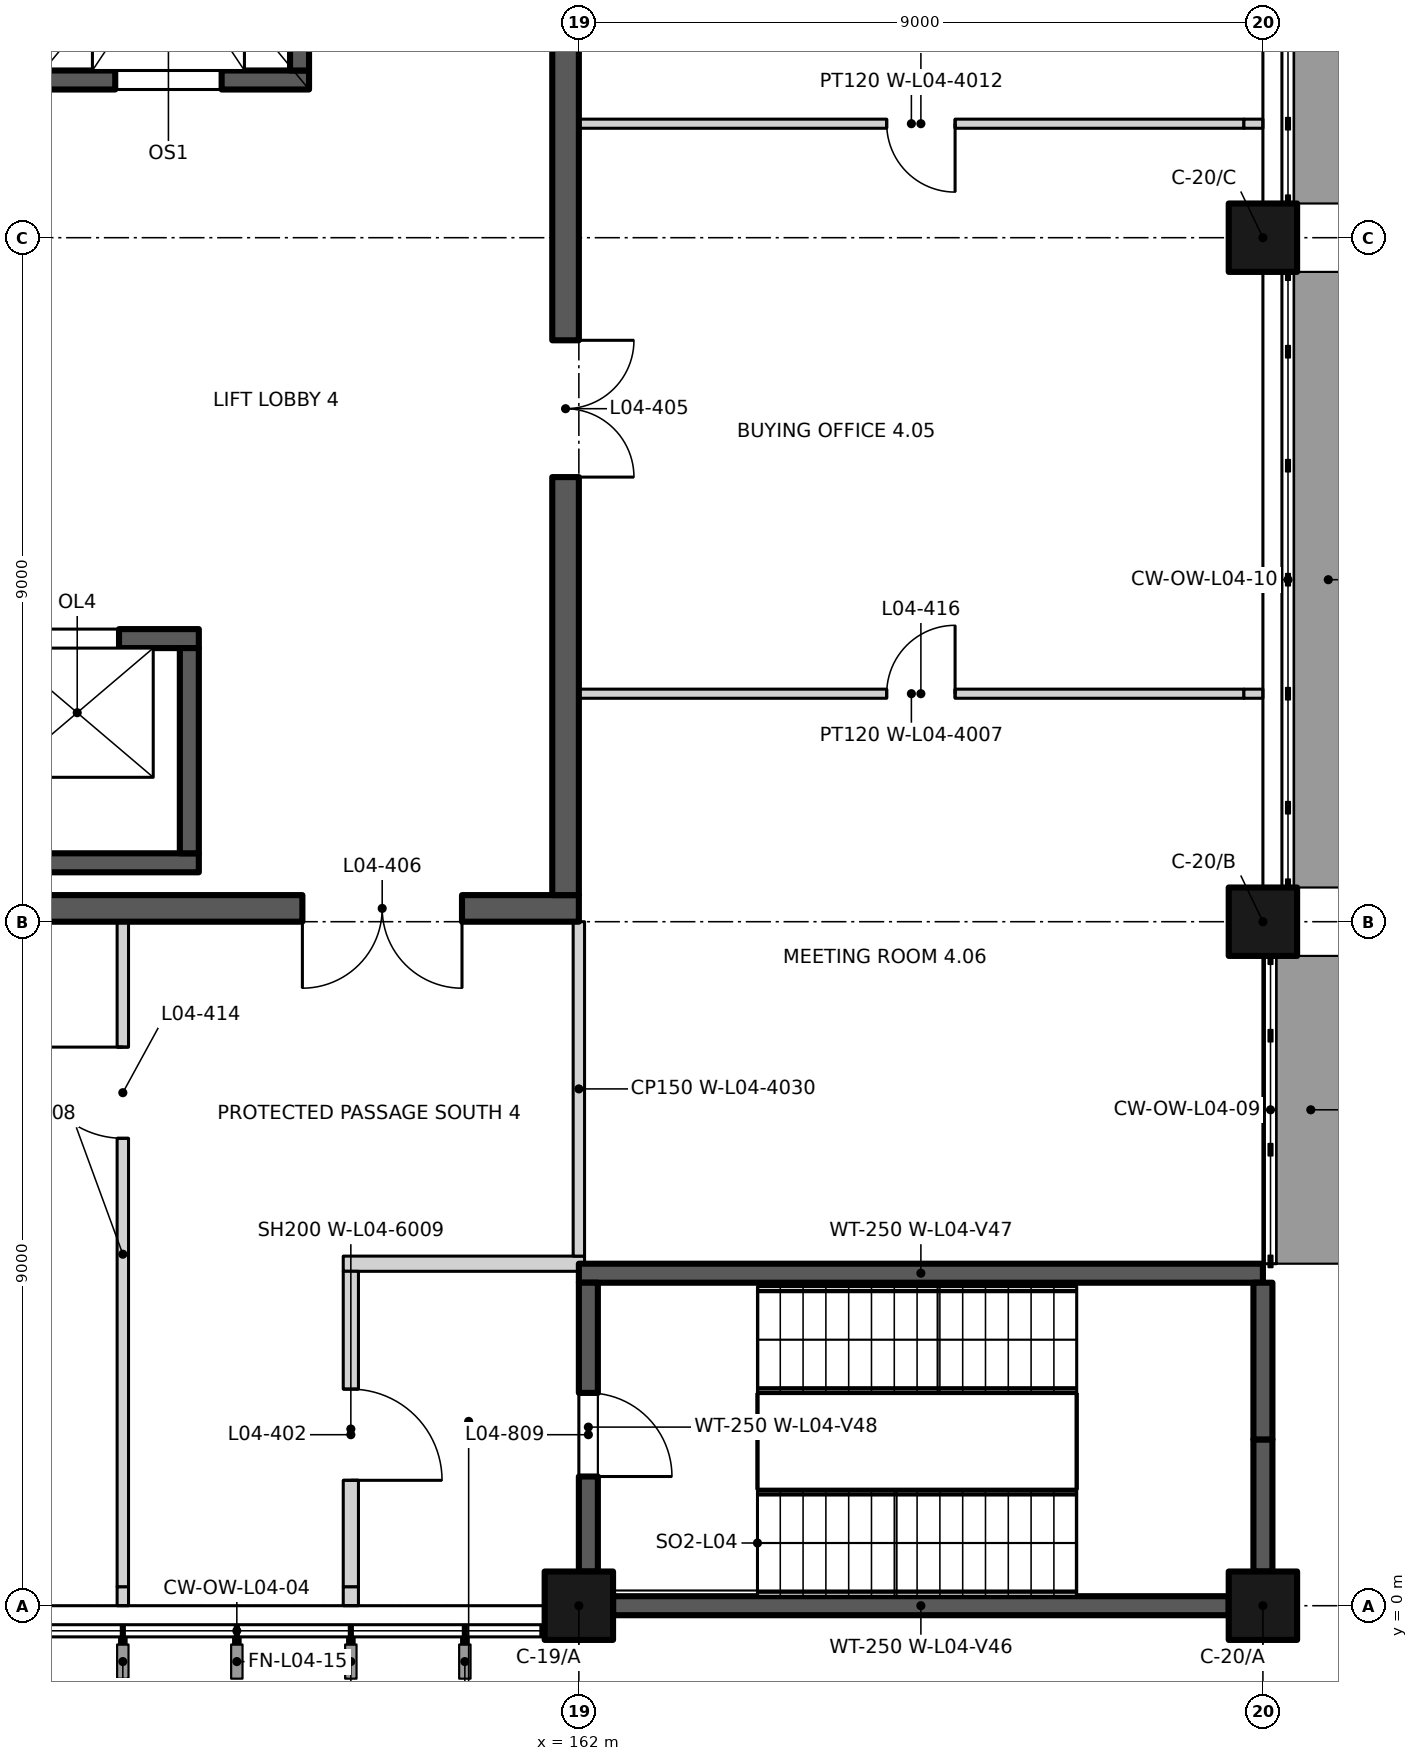
"""IFC4 building model, lengths in metres.
Left out: names, types, materials, properties, quantities, classifications, styles, units other than length and angle.
Written with IfcOpenShell. Run it as: python <this file> out.ifc"""

import sys

from ifc_helpers import new_model, si_unit, direction, frame, frame_2d, origin, origin_2d, place, context, subcontext, project, spatial, rectangle, extrude, element, fill, save


model = new_model("IFC4")
c1 = context("Model", 3, precision=1e-05, world=origin(), true_north=direction((0.0, 1.0)))
c2 = subcontext(c1, "Body", "Model", "MODEL_VIEW")
j1 = project(units=[si_unit("LENGTHUNIT", "METRE"), si_unit("PLANEANGLEUNIT", "RADIAN")], contexts=[c1])
p1 = place(None, origin())
s1 = spatial("IfcSite", under=j1, at=p1, CompositionType="ELEMENT")
p2 = place(p1, origin())
s2 = spatial("IfcBuilding", under=s1, at=p2, CompositionType="ELEMENT")
p3 = place(p2, frame((0.0, 0.0, 19.5)))
s3 = spatial("IfcBuildingStorey", under=s2, at=p3, CompositionType="ELEMENT", Elevation=19.5)
for number, where, z_axis, x_axis in (
    (1, (162.0, 0.0, 0.0), (0.0, 0.0, 1.0), (1.0, 0.0, 0.0)),
    (2, (171.0, 0.0, 0.0), (0.0, 0.0, 1.0), (1.0, 0.0, 0.0)),
    (3, (171.0, 9.0, 0.0), (0.0, 0.0, 1.0), (1.0, 0.0, 0.0)),
    (4, (171.0, 18.0, 0.0), (0.0, 0.0, 1.0), (1.0, 0.0, 0.0)),
):
    element("IfcColumn", number, at=place(p3, frame(where, z_axis=z_axis, x_axis=x_axis)), inside=s3, PredefinedType="COLUMN", context=c2, shape_type="SweptSolid", body=[
        extrude(rectangle(XDim=0.9, YDim=0.9, at=origin_2d()), origin(), (0.0, 0.0, 1.0), 4.5),
    ])
p4 = place(p3, frame((162.45, 0.0, 0.0), z_axis=(0.0, 0.0, 1.0), x_axis=(1.0, 0.0, 0.0)))
e5 = element("IfcWall", 5, at=p4, inside=s3, PredefinedType="SHEAR", context=c2, shape_type="SweptSolid", body=[
    extrude(rectangle(XDim=8.1, YDim=0.25, at=frame_2d((4.05, 0.0))), origin(), (0.0, 0.0, 1.0), 4.5),
])
p5 = place(p3, frame((162.0, 4.375, 0.0), z_axis=(0.0, 0.0, 1.0), x_axis=(1.0, 0.0, 0.0)))
e6 = element("IfcWall", 6, at=p5, inside=s3, PredefinedType="SHEAR", context=c2, shape_type="SweptSolid", body=[
    extrude(rectangle(XDim=9.0, YDim=0.25, at=frame_2d((4.5, 0.0))), origin(), (0.0, 0.0, 1.0), 4.5),
])
p6 = place(p3, frame((162.125, 0.45, 0.0), z_axis=(0.0, 0.0, 1.0), x_axis=(0.0, 1.0, 0.0)))
e7 = element("IfcWall", 7, at=p6, inside=s3, PredefinedType="SHEAR", context=c2, shape_type="SweptSolid", body=[
    extrude(rectangle(XDim=3.8, YDim=0.25, at=frame_2d((1.9, 0.0))), origin(), (0.0, 0.0, 1.0), 4.5),
])
p7 = place(p6, frame((2.35, 0.0, 0.0), z_axis=(0.0, 0.0, 1.0), x_axis=(-1.0, 0.0, 0.0)))
e8 = element("IfcOpeningElement", 8, at=p7, cuts=e7, PredefinedType="OPENING", context=c2, shape_type="SweptSolid", body=[
    extrude(rectangle(XDim=1.1, YDim=2.1, at=frame_2d((0.55, 1.05))), frame((0.0, 0.135, 0.0), z_axis=(0.0, -1.0, 0.0), x_axis=(1.0, 0.0, 0.0)), (0.0, 0.0, 1.0), 0.27),
])
p8 = place(p3, frame((171.0, 0.45, 0.0), z_axis=(0.0, 0.0, 1.0), x_axis=(0.0, 1.0, 0.0)))
e9 = element("IfcWall", 9, at=p8, inside=s3, PredefinedType="SHEAR", context=c2, shape_type="SweptSolid", body=[
    extrude(rectangle(XDim=1.738, YDim=0.25, at=frame_2d((0.869, 0.0))), origin(), (0.0, 0.0, 1.0), 4.5),
])
p9 = place(p3, frame((171.0, 2.188, 0.0), z_axis=(0.0, 0.0, 1.0), x_axis=(0.0, 1.0, 0.0)))
e10 = element("IfcWall", 10, at=p9, inside=s3, PredefinedType="SHEAR", context=c2, shape_type="SweptSolid", body=[
    extrude(rectangle(XDim=2.062, YDim=0.25, at=frame_2d((1.031, 0.0))), origin(), (0.0, 0.0, 1.0), 4.5),
])
p10 = place(p3, frame((144.95, 12.725, 0.0), z_axis=(0.0, 0.0, 1.0), x_axis=(1.0, 0.0, 0.0)))
e11 = element("IfcWall", 11, at=p10, inside=s3, PredefinedType="SHEAR", context=c2, shape_type="SweptSolid", body=[
    extrude(rectangle(XDim=12.05, YDim=0.25, at=frame_2d((6.025, 0.0))), origin(), (0.0, 0.0, 1.0), 4.5),
])
p11 = place(p10, frame((1.05, 0.0, 0.0)))
e12 = element("IfcOpeningElement", 12, at=p11, cuts=e11, PredefinedType="OPENING", context=c2, shape_type="SweptSolid", body=[
    extrude(rectangle(XDim=1.1, YDim=2.1, at=frame_2d((0.55, 1.05))), frame((0.0, 0.135, 0.0), z_axis=(0.0, -1.0, 0.0), x_axis=(1.0, 0.0, 0.0)), (0.0, 0.0, 1.0), 0.27),
])
p12 = place(p10, frame((4.0, 0.0, 0.0)))
e13 = element("IfcOpeningElement", 13, at=p12, cuts=e11, PredefinedType="OPENING", context=c2, shape_type="SweptSolid", body=[
    extrude(rectangle(XDim=1.1, YDim=2.1, at=frame_2d((0.55, 1.05))), frame((0.0, 0.135, 0.0), z_axis=(0.0, -1.0, 0.0), x_axis=(1.0, 0.0, 0.0)), (0.0, 0.0, 1.0), 0.27),
])
p13 = place(p10, frame((6.95, 0.0, 0.0)))
e14 = element("IfcOpeningElement", 14, at=p13, cuts=e11, PredefinedType="OPENING", context=c2, shape_type="SweptSolid", body=[
    extrude(rectangle(XDim=1.1, YDim=2.1, at=frame_2d((0.55, 1.05))), frame((0.0, 0.135, 0.0), z_axis=(0.0, -1.0, 0.0), x_axis=(1.0, 0.0, 0.0)), (0.0, 0.0, 1.0), 0.27),
])
p14 = place(p10, frame((9.9, 0.0, 0.0)))
e15 = element("IfcOpeningElement", 15, at=p14, cuts=e11, PredefinedType="OPENING", context=c2, shape_type="SweptSolid", body=[
    extrude(rectangle(XDim=1.1, YDim=2.1, at=frame_2d((0.55, 1.05))), frame((0.0, 0.135, 0.0), z_axis=(0.0, -1.0, 0.0), x_axis=(1.0, 0.0, 0.0)), (0.0, 0.0, 1.0), 0.27),
])
p15 = place(p3, frame((144.95, 9.775, 0.0), z_axis=(0.0, 0.0, 1.0), x_axis=(1.0, 0.0, 0.0)))
e16 = element("IfcWall", 16, at=p15, inside=s3, PredefinedType="SHEAR", context=c2, shape_type="SweptSolid", body=[
    extrude(rectangle(XDim=12.05, YDim=0.25, at=frame_2d((6.025, 0.0))), origin(), (0.0, 0.0, 1.0), 4.5),
])
p16 = place(p3, frame((156.875, 9.9, 0.0), z_axis=(0.0, 0.0, 1.0), x_axis=(0.0, 1.0, 0.0)))
e17 = element("IfcWall", 17, at=p16, inside=s3, PredefinedType="SHEAR", context=c2, shape_type="SweptSolid", body=[
    extrude(rectangle(XDim=2.7, YDim=0.25, at=frame_2d((1.35, 0.0))), origin(), (0.0, 0.0, 1.0), 4.5),
])
p17 = place(p3, frame((154.75, 20.075, 0.0), z_axis=(0.0, 0.0, 1.0), x_axis=(1.0, 0.0, 0.0)))
e18 = element("IfcWall", 18, at=p17, inside=s3, PredefinedType="SHEAR", context=c2, shape_type="SweptSolid", body=[
    extrude(rectangle(XDim=3.7, YDim=0.25, at=frame_2d((1.85, 0.0))), origin(), (0.0, 0.0, 1.0), 4.5),
])
p18 = place(p17, frame((1.15, 0.0, 0.0)))
e19 = element("IfcOpeningElement", 19, at=p18, cuts=e18, PredefinedType="OPENING", context=c2, shape_type="SweptSolid", body=[
    extrude(rectangle(XDim=1.4, YDim=2.1, at=frame_2d((0.7, 1.05))), frame((0.0, 0.135, 0.0), z_axis=(0.0, -1.0, 0.0), x_axis=(1.0, 0.0, 0.0)), (0.0, 0.0, 1.0), 0.27),
])
p19 = place(p3, frame((158.325, 20.2, 0.0), z_axis=(0.0, 0.0, 1.0), x_axis=(0.0, 1.0, 0.0)))
e20 = element("IfcWall", 20, at=p19, inside=s3, PredefinedType="SHEAR", context=c2, shape_type="SweptSolid", body=[
    extrude(rectangle(XDim=4.0, YDim=0.25, at=frame_2d((2.0, 0.0))), origin(), (0.0, 0.0, 1.0), 4.5),
])
p20 = place(p3, frame((158.9, 4.5, 0.0), z_axis=(0.0, 0.0, 1.0), x_axis=(1.0, 0.0, 0.0)))
e21 = element("IfcWall", 21, at=p20, inside=s3, PredefinedType="PARTITIONING", context=c2, shape_type="SweptSolid", body=[
    extrude(rectangle(XDim=3.175, YDim=0.2, at=frame_2d((1.587, 0.0))), origin(), (0.0, 0.0, 1.0), 4.2),
])
p21 = place(p3, frame((144.0, 9.175, 0.0), z_axis=(0.0, 0.0, 1.0), x_axis=(1.0, 0.0, 0.0)))
e22 = element("IfcWall", 22, at=p21, inside=s3, PredefinedType="SHEAR", context=c2, shape_type="SweptSolid", body=[
    extrude(rectangle(XDim=18.0, YDim=0.35, at=frame_2d((9.0, 0.0))), origin(), (0.0, 0.0, 1.0), 4.2),
])
p22 = place(p21, frame((16.463, 0.0, 0.0), z_axis=(0.0, 0.0, 1.0), x_axis=(-1.0, 0.0, 0.0)))
e23 = element("IfcOpeningElement", 23, at=p22, cuts=e22, PredefinedType="OPENING", context=c2, shape_type="SweptSolid", body=[
    extrude(rectangle(XDim=2.1, YDim=2.4, at=frame_2d((1.05, 1.2))), frame((0.0, 0.185, 0.0), z_axis=(0.0, -1.0, 0.0), x_axis=(1.0, 0.0, 0.0)), (0.0, 0.0, 1.0), 0.37),
])
p23 = place(p3, frame((162.0, 12.0, 0.0), z_axis=(0.0, 0.0, 1.0), x_axis=(1.0, 0.0, 0.0)))
e24 = element("IfcWall", 24, at=p23, inside=s3, PredefinedType="PARTITIONING", context=c2, shape_type="SweptSolid", body=[
    extrude(rectangle(XDim=8.75, YDim=0.12, at=frame_2d((4.375, 0.0))), origin(), (0.0, 0.0, 1.0), 4.2),
])
p24 = place(p23, frame((4.05, 0.0, 0.0)))
e25 = element("IfcOpeningElement", 25, at=p24, cuts=e24, PredefinedType="OPENING", context=c2, shape_type="SweptSolid", body=[
    extrude(rectangle(XDim=0.9, YDim=2.1, at=frame_2d((0.45, 1.05))), frame((0.0, 0.07, 0.0), z_axis=(0.0, -1.0, 0.0), x_axis=(1.0, 0.0, 0.0)), (0.0, 0.0, 1.0), 0.14),
])
p25 = place(p3, frame((170.75, 12.0, 0.0), z_axis=(0.0, 0.0, 1.0), x_axis=(1.0, 0.0, 0.0)))
e26 = element("IfcWall", 26, at=p25, inside=s3, PredefinedType="PARTITIONING", context=c2, shape_type="SweptSolid", body=[
    extrude(rectangle(XDim=0.25, YDim=0.12, at=frame_2d((0.125, 0.0))), origin(), (0.0, 0.0, 1.0), 3.6),
])
p26 = place(p3, frame((162.0, 19.5, 0.0), z_axis=(0.0, 0.0, 1.0), x_axis=(1.0, 0.0, 0.0)))
e27 = element("IfcWall", 27, at=p26, inside=s3, PredefinedType="PARTITIONING", context=c2, shape_type="SweptSolid", body=[
    extrude(rectangle(XDim=8.75, YDim=0.12, at=frame_2d((4.375, 0.0))), origin(), (0.0, 0.0, 1.0), 4.2),
])
p27 = place(p26, frame((4.95, 0.0, 0.0), z_axis=(0.0, 0.0, 1.0), x_axis=(-1.0, 0.0, 0.0)))
e28 = element("IfcOpeningElement", 28, at=p27, cuts=e27, PredefinedType="OPENING", context=c2, shape_type="SweptSolid", body=[
    extrude(rectangle(XDim=0.9, YDim=2.1, at=frame_2d((0.45, 1.05))), frame((0.0, 0.07, 0.0), z_axis=(0.0, -1.0, 0.0), x_axis=(1.0, 0.0, 0.0)), (0.0, 0.0, 1.0), 0.14),
])
p28 = place(p3, frame((170.75, 19.5, 0.0), z_axis=(0.0, 0.0, 1.0), x_axis=(1.0, 0.0, 0.0)))
e29 = element("IfcWall", 29, at=p28, inside=s3, PredefinedType="PARTITIONING", context=c2, shape_type="SweptSolid", body=[
    extrude(rectangle(XDim=0.25, YDim=0.12, at=frame_2d((0.125, 0.0))), origin(), (0.0, 0.0, 1.0), 3.6),
])
p29 = place(p3, frame((156.0, 0.0, 0.0), z_axis=(0.0, 0.0, 1.0), x_axis=(0.0, 1.0, 0.0)))
e30 = element("IfcWall", 30, at=p29, inside=s3, PredefinedType="PARTITIONING", context=c2, shape_type="SweptSolid", body=[
    extrude(rectangle(XDim=0.25, YDim=0.15, at=frame_2d((0.125, 0.0))), origin(), (0.0, 0.0, 1.0), 3.6),
])
p30 = place(p3, frame((156.0, 0.25, 0.0), z_axis=(0.0, 0.0, 1.0), x_axis=(0.0, 1.0, 0.0)))
e31 = element("IfcWall", 31, at=p30, inside=s3, PredefinedType="PARTITIONING", context=c2, shape_type="SweptSolid", body=[
    extrude(rectangle(XDim=8.75, YDim=0.15, at=frame_2d((4.375, 0.0))), origin(), (0.0, 0.0, 1.0), 4.2),
])
p31 = place(p30, frame((5.9, 0.0, 0.0)))
e32 = element("IfcOpeningElement", 32, at=p31, cuts=e31, PredefinedType="OPENING", context=c2, shape_type="SweptSolid", body=[
    extrude(rectangle(XDim=1.2, YDim=2.1, at=frame_2d((0.6, 1.05))), frame((0.0, 0.085, 0.0), z_axis=(0.0, -1.0, 0.0), x_axis=(1.0, 0.0, 0.0)), (0.0, 0.0, 1.0), 0.17),
])
p32 = place(p3, frame((159.0, 0.0, 0.0), z_axis=(0.0, 0.0, 1.0), x_axis=(0.0, 1.0, 0.0)))
e33 = element("IfcWall", 33, at=p32, inside=s3, PredefinedType="PARTITIONING", context=c2, shape_type="SweptSolid", body=[
    extrude(rectangle(XDim=0.25, YDim=0.2, at=frame_2d((0.125, 0.0))), origin(), (0.0, 0.0, 1.0), 3.6),
])
p33 = place(p3, frame((159.0, 0.25, 0.0), z_axis=(0.0, 0.0, 1.0), x_axis=(0.0, 1.0, 0.0)))
e34 = element("IfcWall", 34, at=p33, inside=s3, PredefinedType="PARTITIONING", context=c2, shape_type="SweptSolid", body=[
    extrude(rectangle(XDim=4.15, YDim=0.2, at=frame_2d((2.075, 0.0))), origin(), (0.0, 0.0, 1.0), 4.2),
])
p34 = place(p33, frame((2.6, 0.0, 0.0), z_axis=(0.0, 0.0, 1.0), x_axis=(-1.0, 0.0, 0.0)))
e35 = element("IfcOpeningElement", 35, at=p34, cuts=e34, PredefinedType="OPENING", context=c2, shape_type="SweptSolid", body=[
    extrude(rectangle(XDim=1.2, YDim=2.1, at=frame_2d((0.6, 1.05))), frame((0.0, 0.11, 0.0), z_axis=(0.0, -1.0, 0.0), x_axis=(1.0, 0.0, 0.0)), (0.0, 0.0, 1.0), 0.22),
])
p35 = place(p3, frame((161.825, 9.35, 0.0), z_axis=(0.0, 0.0, 1.0), x_axis=(0.0, 1.0, 0.0)))
e36 = element("IfcWall", 36, at=p35, inside=s3, PredefinedType="SHEAR", context=c2, shape_type="SweptSolid", body=[
    extrude(rectangle(XDim=17.4, YDim=0.35, at=frame_2d((8.7, 0.0))), origin(), (0.0, 0.0, 1.0), 4.2),
])
p36 = place(p35, frame((7.3, 0.0, 0.0), z_axis=(0.0, 0.0, 1.0), x_axis=(-1.0, 0.0, 0.0)))
e37 = element("IfcOpeningElement", 37, at=p36, cuts=e36, PredefinedType="OPENING", context=c2, shape_type="SweptSolid", body=[
    extrude(rectangle(XDim=1.8, YDim=2.4, at=frame_2d((0.9, 1.2))), frame((0.0, 0.185, 0.0), z_axis=(0.0, -1.0, 0.0), x_axis=(1.0, 0.0, 0.0)), (0.0, 0.0, 1.0), 0.37),
])
p37 = place(p3, frame((162.0, 4.6, 0.0), z_axis=(0.0, 0.0, 1.0), x_axis=(0.0, 1.0, 0.0)))
e38 = element("IfcWall", 38, at=p37, inside=s3, PredefinedType="PARTITIONING", context=c2, shape_type="SweptSolid", body=[
    extrude(rectangle(XDim=4.4, YDim=0.15, at=frame_2d((2.2, 0.0))), origin(), (0.0, 0.0, 1.0), 4.2),
])
p38 = place(p7, origin())
e39 = element("IfcDoor", 39, at=p38, inside=s3, OperationType="SINGLE_SWING_RIGHT", PredefinedType="DOOR", context=c2, shape_type="SweptSolid", body=[
    extrude(rectangle(XDim=1.1, YDim=2.1, at=frame_2d((0.55, 1.05))), frame((0.0, 0.025, 0.0), z_axis=(0.0, -1.0, 0.0), x_axis=(1.0, 0.0, 0.0)), (0.0, 0.0, 1.0), 0.05),
])
fill(e8, e39)
p39 = place(p14, origin())
e40 = element("IfcDoor", 40, at=p39, inside=s3, OperationType="DOUBLE_DOOR_SLIDING", PredefinedType="DOOR", context=c2, shape_type="SweptSolid", body=[
    extrude(rectangle(XDim=1.1, YDim=2.1, at=frame_2d((0.55, 1.05))), frame((0.0, 0.025, 0.0), z_axis=(0.0, -1.0, 0.0), x_axis=(1.0, 0.0, 0.0)), (0.0, 0.0, 1.0), 0.05),
])
fill(e15, e40)
p40 = place(p18, origin())
e41 = element("IfcDoor", 41, at=p40, inside=s3, OperationType="DOUBLE_DOOR_SLIDING", PredefinedType="DOOR", context=c2, shape_type="SweptSolid", body=[
    extrude(rectangle(XDim=1.4, YDim=2.1, at=frame_2d((0.7, 1.05))), frame((0.0, 0.025, 0.0), z_axis=(0.0, -1.0, 0.0), x_axis=(1.0, 0.0, 0.0)), (0.0, 0.0, 1.0), 0.05),
])
fill(e19, e41)
p41 = place(p34, origin())
e42 = element("IfcDoor", 42, at=p41, inside=s3, OperationType="SINGLE_SWING_RIGHT", PredefinedType="DOOR", context=c2, shape_type="SweptSolid", body=[
    extrude(rectangle(XDim=1.2, YDim=2.1, at=frame_2d((0.6, 1.05))), frame((0.0, 0.025, 0.0), z_axis=(0.0, -1.0, 0.0), x_axis=(1.0, 0.0, 0.0)), (0.0, 0.0, 1.0), 0.05),
])
fill(e35, e42)
p42 = place(p36, origin())
e43 = element("IfcDoor", 43, at=p42, inside=s3, OperationType="DOUBLE_DOOR_SINGLE_SWING", PredefinedType="DOOR", context=c2, shape_type="SweptSolid", body=[
    extrude(rectangle(XDim=1.8, YDim=2.4, at=frame_2d((0.9, 1.2))), frame((0.0, 0.025, 0.0), z_axis=(0.0, -1.0, 0.0), x_axis=(1.0, 0.0, 0.0)), (0.0, 0.0, 1.0), 0.05),
])
fill(e37, e43)
p43 = place(p22, origin())
e44 = element("IfcDoor", 44, at=p43, inside=s3, OperationType="DOUBLE_DOOR_SINGLE_SWING", PredefinedType="DOOR", context=c2, shape_type="SweptSolid", body=[
    extrude(rectangle(XDim=2.1, YDim=2.4, at=frame_2d((1.05, 1.2))), frame((0.0, 0.025, 0.0), z_axis=(0.0, -1.0, 0.0), x_axis=(1.0, 0.0, 0.0)), (0.0, 0.0, 1.0), 0.05),
])
fill(e23, e44)
p44 = place(p31, origin())
e45 = element("IfcDoor", 45, at=p44, inside=s3, OperationType="SINGLE_SWING_RIGHT", PredefinedType="DOOR", context=c2, shape_type="SweptSolid", body=[
    extrude(rectangle(XDim=1.2, YDim=2.1, at=frame_2d((0.6, 1.05))), frame((0.0, 0.025, 0.0), z_axis=(0.0, -1.0, 0.0), x_axis=(1.0, 0.0, 0.0)), (0.0, 0.0, 1.0), 0.05),
])
fill(e32, e45)
p45 = place(p24, origin())
e46 = element("IfcDoor", 46, at=p45, inside=s3, OperationType="SINGLE_SWING_RIGHT", PredefinedType="DOOR", context=c2, shape_type="SweptSolid", body=[
    extrude(rectangle(XDim=0.9, YDim=2.1, at=frame_2d((0.45, 1.05))), frame((0.0, 0.025, 0.0), z_axis=(0.0, -1.0, 0.0), x_axis=(1.0, 0.0, 0.0)), (0.0, 0.0, 1.0), 0.05),
])
fill(e25, e46)
p46 = place(p27, origin())
e47 = element("IfcDoor", 47, at=p46, inside=s3, OperationType="SINGLE_SWING_LEFT", PredefinedType="DOOR", context=c2, shape_type="SweptSolid", body=[
    extrude(rectangle(XDim=0.9, YDim=2.1, at=frame_2d((0.45, 1.05))), frame((0.0, 0.025, 0.0), z_axis=(0.0, -1.0, 0.0), x_axis=(1.0, 0.0, 0.0)), (0.0, 0.0, 1.0), 0.05),
])
fill(e28, e47)
save(model, sys.argv[1])
